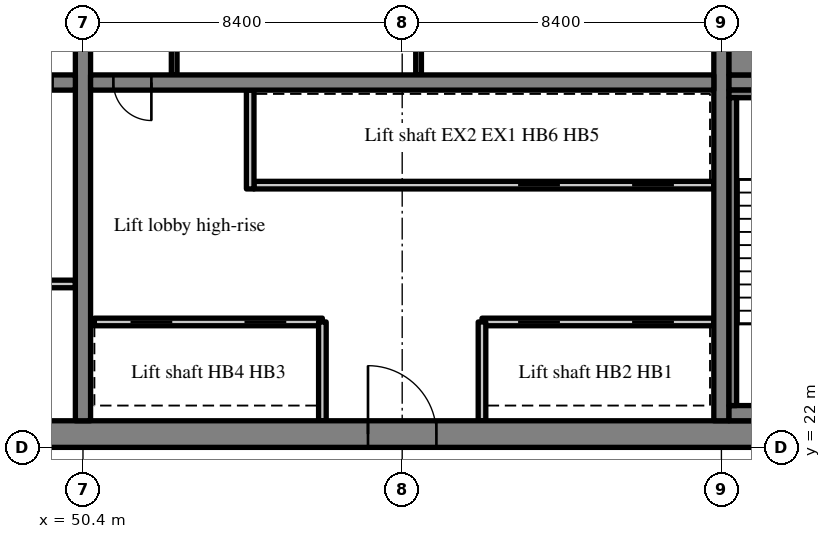
"""IFC4 building model, lengths in metres.
Left out: names, types, materials, properties, quantities, classifications, styles, units other than length and angle.
Written with IfcOpenShell. Run it as: python <this file> out.ifc"""

import sys

from ifc_helpers import new_model, si_unit, direction, frame, frame_2d, origin, place, context, subcontext, project, spatial, rectangle, extrude, source, transform, mapped, element, fill, save


model = new_model("IFC4")
c1 = context("Model", 3, precision=1e-05, world=origin(), true_north=direction((0.0, 1.0)))
c2 = subcontext(c1, "Body", "Model", "MODEL_VIEW")
j1 = project(units=[si_unit("LENGTHUNIT", "METRE"), si_unit("PLANEANGLEUNIT", "RADIAN")], contexts=[c1])
p1 = place(None, origin())
s1 = spatial("IfcSite", under=j1, at=p1, CompositionType="ELEMENT")
p2 = place(p1, origin())
s2 = spatial("IfcBuilding", under=s1, at=p2, CompositionType="ELEMENT")
p3 = place(p2, frame((0.0, 0.0, 155.4)))
s3 = spatial("IfcBuildingStorey", under=s2, at=p3, CompositionType="ELEMENT", Elevation=155.4)
m1 = source(origin(), c2, "Body", "SweptSolid", [
    extrude(rectangle(XDim=50.4, YDim=0.7, at=frame_2d((25.2, 0.0))), origin(), (0.0, 0.0, 1.0), 3.52),
])
p4 = place(p3, frame((25.2, 22.35, 0.0), z_axis=(0.0, 0.0, 1.0), x_axis=(1.0, 0.0, 0.0)))
e1 = element("IfcWall", 1, at=p4, inside=s3, PredefinedType="SHEAR", context=c2, shape_type="MappedRepresentation", body=[
    mapped(m1, transform((0.0, 0.0, 0.0), scale=1.0)),
])
m2 = source(origin(), c2, "Body", "SweptSolid", [
    extrude(rectangle(XDim=1.8, YDim=2.1, at=frame_2d((0.9, 1.05))), frame((0.0, 0.36, 0.0), z_axis=(0.0, -1.0, 0.0), x_axis=(1.0, 0.0, 0.0)), (0.0, 0.0, 1.0), 0.72),
])
p5 = place(p4, frame((15.9, 0.0, 0.0)))
e2 = element("IfcOpeningElement", 2, at=p5, cuts=e1, PredefinedType="OPENING", context=c2, shape_type="MappedRepresentation", body=[
    mapped(m2, transform((0.0, 0.0, 0.0), scale=1.0)),
])
m3 = source(origin(), c2, "Body", "SweptSolid", [
    extrude(rectangle(XDim=0.9, YDim=2.1, at=frame_2d((0.45, 1.05))), frame((0.0, 0.36, 0.0), z_axis=(0.0, -1.0, 0.0), x_axis=(1.0, 0.0, 0.0)), (0.0, 0.0, 1.0), 0.72),
])
p6 = place(p4, frame((21.5, 0.0, 0.0)))
e3 = element("IfcOpeningElement", 3, at=p6, cuts=e1, PredefinedType="OPENING", context=c2, shape_type="MappedRepresentation", body=[
    mapped(m3, transform((0.0, 0.0, 0.0), scale=1.0)),
])
p7 = place(p4, frame((32.7, 0.0, 0.0)))
e4 = element("IfcOpeningElement", 4, at=p7, cuts=e1, PredefinedType="OPENING", context=c2, shape_type="MappedRepresentation", body=[
    mapped(m2, transform((0.0, 0.0, 0.0), scale=1.0)),
])
m4 = source(origin(), c2, "Body", "SweptSolid", [
    extrude(rectangle(XDim=1.2, YDim=2.1, at=frame_2d((0.6, 1.05))), frame((0.0, 0.36, 0.0), z_axis=(0.0, -1.0, 0.0), x_axis=(1.0, 0.0, 0.0)), (0.0, 0.0, 1.0), 0.72),
])
p8 = place(p4, frame((6.475, 0.0, 0.0)))
e5 = element("IfcOpeningElement", 5, at=p8, cuts=e1, PredefinedType="OPENING", context=c2, shape_type="MappedRepresentation", body=[
    mapped(m4, transform((0.0, 0.0, 0.0), scale=1.0)),
])
p9 = place(p4, frame((47.875, 0.0, 0.0)))
e6 = element("IfcOpeningElement", 6, at=p9, cuts=e1, PredefinedType="OPENING", context=c2, shape_type="MappedRepresentation", body=[
    mapped(m4, transform((0.0, 0.0, 0.0), scale=1.0)),
])
m5 = source(origin(), c2, "Body", "SweptSolid", [
    extrude(rectangle(XDim=18.6, YDim=0.4, at=frame_2d((9.3, 0.0))), origin(), (0.0, 0.0, 1.0), 3.52),
])
p10 = place(p3, frame((50.4, 22.7, 0.0), z_axis=(0.0, 0.0, 1.0), x_axis=(0.0, 1.0, 0.0)))
e7 = element("IfcWall", 7, at=p10, inside=s3, PredefinedType="SHEAR", context=c2, shape_type="MappedRepresentation", body=[
    mapped(m5, transform((0.0, 0.0, 0.0), scale=1.0)),
])
m6 = source(origin(), c2, "Body", "SweptSolid", [
    extrude(rectangle(XDim=1.1, YDim=2.1, at=frame_2d((0.55, 1.05))), frame((0.0, 0.21, 0.0), z_axis=(0.0, -1.0, 0.0), x_axis=(1.0, 0.0, 0.0)), (0.0, 0.0, 1.0), 0.42),
])
p11 = place(p10, frame((12.75, 0.0, 0.0)))
e8 = element("IfcOpeningElement", 8, at=p11, cuts=e7, PredefinedType="OPENING", context=c2, shape_type="MappedRepresentation", body=[
    mapped(m6, transform((0.0, 0.0, 0.0), scale=1.0)),
])
p12 = place(p3, frame((67.2, 22.7, 0.0), z_axis=(0.0, 0.0, 1.0), x_axis=(0.0, 1.0, 0.0)))
e9 = element("IfcWall", 9, at=p12, inside=s3, PredefinedType="SHEAR", context=c2, shape_type="MappedRepresentation", body=[
    mapped(m5, transform((0.0, 0.0, 0.0), scale=1.0)),
])
m7 = source(origin(), c2, "Body", "SweptSolid", [
    extrude(rectangle(XDim=16.4, YDim=0.4, at=frame_2d((8.2, 0.0))), origin(), (0.0, 0.0, 1.0), 3.52),
])
p13 = place(p3, frame((33.8, 31.6, 0.0), z_axis=(0.0, 0.0, 1.0), x_axis=(1.0, 0.0, 0.0)))
e10 = element("IfcWall", 10, at=p13, inside=s3, PredefinedType="SHEAR", context=c2, shape_type="MappedRepresentation", body=[
    mapped(m7, transform((0.0, 0.0, 0.0), scale=1.0)),
])
m8 = source(origin(), c2, "Body", "SweptSolid", [
    extrude(rectangle(XDim=1.0, YDim=2.1, at=frame_2d((0.5, 1.05))), frame((0.0, 0.21, 0.0), z_axis=(0.0, -1.0, 0.0), x_axis=(1.0, 0.0, 0.0)), (0.0, 0.0, 1.0), 0.42),
])
p14 = place(p13, frame((14.8, 0.0, 0.0)))
e11 = element("IfcOpeningElement", 11, at=p14, cuts=e10, PredefinedType="OPENING", context=c2, shape_type="MappedRepresentation", body=[
    mapped(m8, transform((0.0, 0.0, 0.0), scale=1.0)),
])
p15 = place(p3, frame((50.6, 31.6, 0.0), z_axis=(0.0, 0.0, 1.0), x_axis=(1.0, 0.0, 0.0)))
e12 = element("IfcWall", 12, at=p15, inside=s3, PredefinedType="SHEAR", context=c2, shape_type="MappedRepresentation", body=[
    mapped(m7, transform((0.0, 0.0, 0.0), scale=1.0)),
])
p16 = place(p15, frame((0.6, 0.0, 0.0)))
e13 = element("IfcOpeningElement", 13, at=p16, cuts=e12, PredefinedType="OPENING", context=c2, shape_type="MappedRepresentation", body=[
    mapped(m8, transform((0.0, 0.0, 0.0), scale=1.0)),
])
m9 = source(origin(), c2, "Body", "SweptSolid", [
    extrude(rectangle(XDim=7.5, YDim=0.4, at=frame_2d((3.75, 0.0))), origin(), (0.0, 0.0, 1.0), 3.52),
])
p17 = place(p3, frame((67.4, 31.6, 0.0), z_axis=(0.0, 0.0, 1.0), x_axis=(1.0, 0.0, 0.0)))
e14 = element("IfcWall", 14, at=p17, inside=s3, PredefinedType="SHEAR", context=c2, shape_type="MappedRepresentation", body=[
    mapped(m9, transform((0.0, 0.0, 0.0), scale=1.0)),
])
p18 = place(p17, frame((5.725, 0.0, 0.0)))
e15 = element("IfcOpeningElement", 15, at=p18, cuts=e14, PredefinedType="OPENING", context=c2, shape_type="MappedRepresentation", body=[
    mapped(m6, transform((0.0, 0.0, 0.0), scale=1.0)),
])
m10 = source(origin(), c2, "Body", "SweptSolid", [
    extrude(rectangle(XDim=6.1, YDim=0.2, at=frame_2d((3.05, 0.0))), origin(), (0.0, 0.0, 1.0), 3.52),
])
p19 = place(p3, frame((44.1, 26.3, 0.0), z_axis=(0.0, 0.0, 1.0), x_axis=(1.0, 0.0, 0.0)))
e16 = element("IfcWall", 16, at=p19, inside=s3, PredefinedType="PARTITIONING", context=c2, shape_type="MappedRepresentation", body=[
    mapped(m10, transform((0.0, 0.0, 0.0), scale=1.0)),
])
m11 = source(origin(), c2, "Body", "SweptSolid", [
    extrude(rectangle(XDim=6.1, YDim=0.2, at=frame_2d((3.05, 0.0))), origin(), (0.0, 0.0, 1.0), 3.52),
])
p20 = place(p3, frame((67.0, 25.3, 0.0), z_axis=(0.0, 0.0, 1.0), x_axis=(-1.0, 0.0, 0.0)))
e17 = element("IfcWall", 17, at=p20, inside=s3, PredefinedType="SOLIDWALL", context=c2, shape_type="MappedRepresentation", body=[
    mapped(m11, transform((0.0, 0.0, 0.0), scale=1.0)),
])
m12 = source(origin(), c2, "Body", "SweptSolid", [
    extrude(rectangle(XDim=1.1, YDim=2.1, at=frame_2d((0.55, 1.05))), frame((0.0, 0.11, 0.0), z_axis=(0.0, -1.0, 0.0), x_axis=(1.0, 0.0, 0.0)), (0.0, 0.0, 1.0), 0.22),
])
p21 = place(p20, frame((1.05, 0.0, 0.0)))
e18 = element("IfcOpeningElement", 18, at=p21, cuts=e17, PredefinedType="OPENING", context=c2, shape_type="MappedRepresentation", body=[
    mapped(m12, transform((0.0, 0.0, 0.0), scale=1.0)),
])
p22 = place(p20, frame((4.05, 0.0, 0.0)))
e19 = element("IfcOpeningElement", 19, at=p22, cuts=e17, PredefinedType="OPENING", context=c2, shape_type="MappedRepresentation", body=[
    mapped(m12, transform((0.0, 0.0, 0.0), scale=1.0)),
])
m13 = source(origin(), c2, "Body", "SweptSolid", [
    extrude(rectangle(XDim=6.0, YDim=0.2, at=frame_2d((3.0, 0.0))), origin(), (0.0, 0.0, 1.0), 3.52),
])
p23 = place(p3, frame((56.7, 25.3, 0.0), z_axis=(0.0, 0.0, 1.0), x_axis=(-1.0, 0.0, 0.0)))
e20 = element("IfcWall", 20, at=p23, inside=s3, PredefinedType="SOLIDWALL", context=c2, shape_type="MappedRepresentation", body=[
    mapped(m13, transform((0.0, 0.0, 0.0), scale=1.0)),
])
p24 = place(p23, frame((0.95, 0.0, 0.0)))
e21 = element("IfcOpeningElement", 21, at=p24, cuts=e20, PredefinedType="OPENING", context=c2, shape_type="MappedRepresentation", body=[
    mapped(m12, transform((0.0, 0.0, 0.0), scale=1.0)),
])
p25 = place(p23, frame((3.95, 0.0, 0.0)))
e22 = element("IfcOpeningElement", 22, at=p25, cuts=e20, PredefinedType="OPENING", context=c2, shape_type="MappedRepresentation", body=[
    mapped(m12, transform((0.0, 0.0, 0.0), scale=1.0)),
])
m14 = source(origin(), c2, "Body", "SweptSolid", [
    extrude(rectangle(XDim=12.1, YDim=0.2, at=frame_2d((6.05, 0.0))), origin(), (0.0, 0.0, 1.0), 3.52),
])
p26 = place(p3, frame((67.0, 28.9, 0.0), z_axis=(0.0, 0.0, 1.0), x_axis=(-1.0, 0.0, 0.0)))
e23 = element("IfcWall", 23, at=p26, inside=s3, PredefinedType="SOLIDWALL", context=c2, shape_type="MappedRepresentation", body=[
    mapped(m14, transform((0.0, 0.0, 0.0), scale=1.0)),
])
p27 = place(p26, frame((1.05, 0.0, 0.0)))
e24 = element("IfcOpeningElement", 24, at=p27, cuts=e23, PredefinedType="OPENING", context=c2, shape_type="MappedRepresentation", body=[
    mapped(m12, transform((0.0, 0.0, 0.0), scale=1.0)),
])
p28 = place(p26, frame((4.05, 0.0, 0.0)))
e25 = element("IfcOpeningElement", 25, at=p28, cuts=e23, PredefinedType="OPENING", context=c2, shape_type="MappedRepresentation", body=[
    mapped(m12, transform((0.0, 0.0, 0.0), scale=1.0)),
])
m15 = source(origin(), c2, "Body", "SweptSolid", [
    extrude(rectangle(XDim=2.6, YDim=0.2, at=frame_2d((1.3, 0.0))), origin(), (0.0, 0.0, 1.0), 3.52),
])
for number, where, z_axis, x_axis in (
    (26, (60.9, 22.7, 0.0), (0.0, 0.0, 1.0), (0.0, 1.0, 0.0)),
    (27, (56.7, 22.7, 0.0), (0.0, 0.0, 1.0), (0.0, 1.0, 0.0)),
):
    element("IfcWall", number, at=place(p3, frame(where, z_axis=z_axis, x_axis=x_axis)), inside=s3, PredefinedType="SOLIDWALL", context=c2, shape_type="MappedRepresentation", body=[
        mapped(m15, transform((0.0, 0.0, 0.0), scale=1.0)),
    ])
m16 = source(origin(), c2, "Body", "SweptSolid", [
    extrude(rectangle(XDim=2.6, YDim=0.2, at=frame_2d((1.3, 0.0))), origin(), (0.0, 0.0, 1.0), 3.52),
])
p29 = place(p3, frame((54.8, 28.8, 0.0), z_axis=(0.0, 0.0, 1.0), x_axis=(0.0, 1.0, 0.0)))
e28 = element("IfcWall", 28, at=p29, inside=s3, PredefinedType="SOLIDWALL", context=c2, shape_type="MappedRepresentation", body=[
    mapped(m16, transform((0.0, 0.0, 0.0), scale=1.0)),
])
m17 = source(origin(), c2, "Body", "SweptSolid", [
    extrude(rectangle(XDim=3.2, YDim=0.15, at=frame_2d((1.6, 0.0))), origin(), (0.0, 0.0, 1.0), 3.52),
])
for number, where, z_axis, x_axis in (
    (29, (52.8, 31.8, 0.0), (0.0, 0.0, 1.0), (0.0, 1.0, 0.0)),
    (30, (59.231, 31.8, 0.0), (0.0, 0.0, 1.0), (0.0, 1.0, 0.0)),
):
    element("IfcWall", number, at=place(p3, frame(where, z_axis=z_axis, x_axis=x_axis)), inside=s3, PredefinedType="PARTITIONING", context=c2, shape_type="MappedRepresentation", body=[
        mapped(m17, transform((0.0, 0.0, 0.0), scale=1.0)),
    ])
m18 = source(origin(), c2, "Body", "SweptSolid", [
    extrude(rectangle(XDim=4.85, YDim=0.4, at=frame_2d((2.425, 0.0))), origin(), (0.0, 0.0, 1.0), 3.52),
])
p30 = place(p3, frame((67.4, 22.9, 0.0), z_axis=(0.0, 0.0, 1.0), x_axis=(1.0, 0.0, 0.0)))
e31 = element("IfcWall", 31, at=p30, inside=s3, PredefinedType="SOLIDWALL", context=c2, shape_type="MappedRepresentation", body=[
    mapped(m18, transform((0.0, 0.0, 0.0), scale=1.0)),
])
m19 = source(origin(), c2, "Body", "SweptSolid", [
    extrude(rectangle(XDim=4.85, YDim=0.2, at=frame_2d((2.425, 0.0))), origin(), (0.0, 0.0, 1.0), 3.52),
])
p31 = place(p3, frame((67.4, 31.3, 0.0), z_axis=(0.0, 0.0, 1.0), x_axis=(1.0, 0.0, 0.0)))
e32 = element("IfcWall", 32, at=p31, inside=s3, PredefinedType="SOLIDWALL", context=c2, shape_type="MappedRepresentation", body=[
    mapped(m19, transform((0.0, 0.0, 0.0), scale=1.0)),
])
m20 = source(origin(), c2, "Body", "SweptSolid", [
    extrude(rectangle(XDim=8.1, YDim=0.2, at=frame_2d((4.05, 0.0))), origin(), (0.0, 0.0, 1.0), 3.52),
])
p32 = place(p3, frame((67.5, 23.1, 0.0), z_axis=(0.0, 0.0, 1.0), x_axis=(0.0, 1.0, 0.0)))
e33 = element("IfcWall", 33, at=p32, inside=s3, PredefinedType="SOLIDWALL", context=c2, shape_type="MappedRepresentation", body=[
    mapped(m20, transform((0.0, 0.0, 0.0), scale=1.0)),
])
m21 = source(origin(), c2, "Body", "SweptSolid", [
    extrude(rectangle(XDim=4.85, YDim=1.0, at=frame_2d((2.425, 0.0))), origin(), (0.0, 0.0, 1.0), 3.52),
])
p33 = place(p3, frame((67.4, 32.3, 0.0), z_axis=(0.0, 0.0, 1.0), x_axis=(1.0, 0.0, 0.0)))
e34 = element("IfcWall", 34, at=p33, inside=s3, PredefinedType="SOLIDWALL", context=c2, shape_type="MappedRepresentation", body=[
    mapped(m21, transform((0.0, 0.0, 0.0), scale=1.0)),
])
m22 = source(origin(), c2, "Body", "SweptSolid", [
    extrude(rectangle(XDim=1.8, YDim=2.1, at=frame_2d((0.9, 1.05))), frame((0.0, 0.275, 0.0), z_axis=(0.0, -1.0, 0.0), x_axis=(1.0, 0.0, 0.0)), (0.0, 0.0, 1.0), 0.05),
])
p34 = place(p7, origin())
e35 = element("IfcDoor", 35, at=p34, inside=s3, OperationType="DOUBLE_DOOR_SINGLE_SWING", PredefinedType="DOOR", context=c2, shape_type="MappedRepresentation", body=[
    mapped(m22, transform((0.0, 0.0, 0.0), scale=1.0)),
])
fill(e4, e35)
m23 = source(origin(), c2, "Body", "SweptSolid", [
    extrude(rectangle(XDim=1.0, YDim=2.1, at=frame_2d((0.5, 1.05))), frame((0.0, 0.025, 0.0), z_axis=(0.0, -1.0, 0.0), x_axis=(1.0, 0.0, 0.0)), (0.0, 0.0, 1.0), 0.05),
])
p35 = place(p16, origin())
e36 = element("IfcDoor", 36, at=p35, inside=s3, OperationType="SINGLE_SWING_RIGHT", PredefinedType="DOOR", context=c2, shape_type="MappedRepresentation", body=[
    mapped(m23, transform((0.0, 0.0, 0.0), scale=1.0)),
])
fill(e13, e36)
m24 = source(origin(), c2, "Body", "SweptSolid", [
    extrude(rectangle(XDim=1.1, YDim=2.1, at=frame_2d((0.55, 1.05))), frame((0.0, 0.025, 0.0), z_axis=(0.0, -1.0, 0.0), x_axis=(1.0, 0.0, 0.0)), (0.0, 0.0, 1.0), 0.05),
])
p36 = place(p21, origin())
e37 = element("IfcDoor", 37, at=p36, inside=s3, OperationType="SLIDING_TO_RIGHT", PredefinedType="DOOR", context=c2, shape_type="MappedRepresentation", body=[
    mapped(m24, transform((0.0, 0.0, 0.0), scale=1.0)),
])
fill(e18, e37)
p37 = place(p22, origin())
e38 = element("IfcDoor", 38, at=p37, inside=s3, OperationType="SLIDING_TO_LEFT", PredefinedType="DOOR", context=c2, shape_type="MappedRepresentation", body=[
    mapped(m24, transform((0.0, 0.0, 0.0), scale=1.0)),
])
fill(e19, e38)
p38 = place(p24, origin())
e39 = element("IfcDoor", 39, at=p38, inside=s3, OperationType="SLIDING_TO_RIGHT", PredefinedType="DOOR", context=c2, shape_type="MappedRepresentation", body=[
    mapped(m24, transform((0.0, 0.0, 0.0), scale=1.0)),
])
fill(e21, e39)
p39 = place(p25, origin())
e40 = element("IfcDoor", 40, at=p39, inside=s3, OperationType="SLIDING_TO_LEFT", PredefinedType="DOOR", context=c2, shape_type="MappedRepresentation", body=[
    mapped(m24, transform((0.0, 0.0, 0.0), scale=1.0)),
])
fill(e22, e40)
p40 = place(p27, origin())
e41 = element("IfcDoor", 41, at=p40, inside=s3, OperationType="SLIDING_TO_RIGHT", PredefinedType="DOOR", context=c2, shape_type="MappedRepresentation", body=[
    mapped(m24, transform((0.0, 0.0, 0.0), scale=1.0)),
])
fill(e24, e41)
p41 = place(p28, origin())
e42 = element("IfcDoor", 42, at=p41, inside=s3, OperationType="SLIDING_TO_LEFT", PredefinedType="DOOR", context=c2, shape_type="MappedRepresentation", body=[
    mapped(m24, transform((0.0, 0.0, 0.0), scale=1.0)),
])
fill(e25, e42)
save(model, sys.argv[1])
